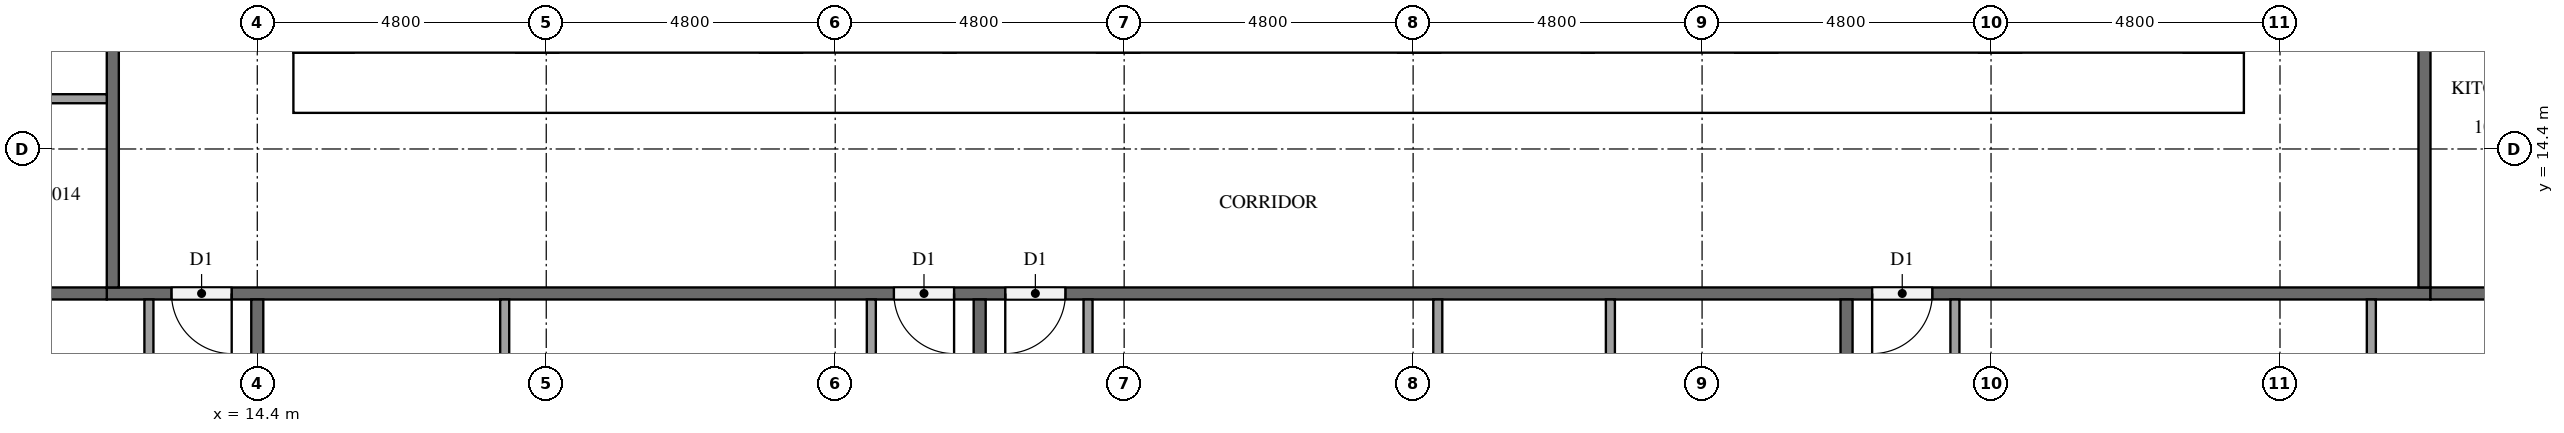
"""IFC4 building model, lengths in metres.
Left out: names, types, materials, properties, quantities, classifications, styles, units other than length and angle.
Written with IfcOpenShell. Run it as: python <this file> out.ifc"""

import sys

from ifc_helpers import new_model, si_unit, direction, frame, frame_2d, origin, place, context, subcontext, project, spatial, rectangle, extrude, element, fill, save


model = new_model("IFC4")
c1 = context("Model", 3, precision=1e-05, world=origin(), true_north=direction((0.0, 1.0)))
c2 = subcontext(c1, "Body", "Model", "MODEL_VIEW")
j1 = project(units=[si_unit("LENGTHUNIT", "METRE"), si_unit("PLANEANGLEUNIT", "RADIAN")], contexts=[c1])
p1 = place(None, origin())
s1 = spatial("IfcSite", under=j1, at=p1, CompositionType="ELEMENT")
p2 = place(p1, origin())
s2 = spatial("IfcBuilding", under=s1, at=p2, CompositionType="ELEMENT")
p3 = place(p2, frame((0.0, 0.0, 43.4)))
s3 = spatial("IfcBuildingStorey", under=s2, at=p3, CompositionType="ELEMENT", Elevation=43.4)
p4 = place(p3, frame((15.0, 15.5, 0.0), z_axis=(0.0, 0.0, 1.0), x_axis=(1.0, 0.0, 0.0)))
e1 = element("IfcWall", 1, at=p4, inside=s3, PredefinedType="SHEAR", context=c2, shape_type="SweptSolid", body=[
    extrude(rectangle(XDim=32.4, YDim=1.0, at=frame_2d((16.2, 0.0))), origin(), (0.0, 0.0, 1.0), 3.2),
])
p5 = place(p4, frame((15.3, 0.0, 0.0)))
e2 = element("IfcOpeningElement", 2, at=p5, cuts=e1, PredefinedType="OPENING", context=c2, shape_type="SweptSolid", body=[
    extrude(rectangle(XDim=1.8, YDim=2.1, at=frame_2d((0.9, 1.05))), frame((0.0, 0.51, 0.0), z_axis=(0.0, -1.0, 0.0), x_axis=(1.0, 0.0, 0.0)), (0.0, 0.0, 1.0), 1.02),
])
p6 = place(p3, frame((15.5, 16.0, 0.0), z_axis=(0.0, 0.0, 1.0), x_axis=(0.0, 1.0, 0.0)))
e3 = element("IfcWall", 3, at=p6, inside=s3, PredefinedType="SHEAR", context=c2, shape_type="SweptSolid", body=[
    extrude(rectangle(XDim=20.8, YDim=1.0, at=frame_2d((10.4, 0.0))), origin(), (0.0, 0.0, 1.0), 3.2),
])
p7 = place(p6, frame((4.76, 0.0, 0.0)))
e4 = element("IfcOpeningElement", 4, at=p7, cuts=e3, PredefinedType="OPENING", context=c2, shape_type="SweptSolid", body=[
    extrude(rectangle(XDim=1.2, YDim=2.1, at=frame_2d((0.6, 1.05))), frame((0.0, 0.51, 0.0), z_axis=(0.0, -1.0, 0.0), x_axis=(1.0, 0.0, 0.0)), (0.0, 0.0, 1.0), 1.02),
])
p8 = place(p3, frame((46.9, 16.0, 0.0), z_axis=(0.0, 0.0, 1.0), x_axis=(0.0, 1.0, 0.0)))
e5 = element("IfcWall", 5, at=p8, inside=s3, PredefinedType="SHEAR", context=c2, shape_type="SweptSolid", body=[
    extrude(rectangle(XDim=20.8, YDim=1.0, at=frame_2d((10.4, 0.0))), origin(), (0.0, 0.0, 1.0), 3.2),
])
p9 = place(p8, frame((10.1, 0.0, 0.0)))
e6 = element("IfcOpeningElement", 6, at=p9, cuts=e5, PredefinedType="OPENING", context=c2, shape_type="SweptSolid", body=[
    extrude(rectangle(XDim=1.2, YDim=2.1, at=frame_2d((0.6, 1.05))), frame((0.0, 0.51, 0.0), z_axis=(0.0, -1.0, 0.0), x_axis=(1.0, 0.0, 0.0)), (0.0, 0.0, 1.0), 1.02),
])
p10 = place(p3, frame((23.1, 16.0, 0.0), z_axis=(0.0, 0.0, 1.0), x_axis=(0.0, 1.0, 0.0)))
e7 = element("IfcWall", 7, at=p10, inside=s3, PredefinedType="SHEAR", context=c2, shape_type="SweptSolid", body=[
    extrude(rectangle(XDim=20.8, YDim=0.7, at=frame_2d((10.4, 0.0))), origin(), (0.0, 0.0, 1.0), 3.2),
])
p11 = place(p3, frame((50.5, 12.0, 0.0), z_axis=(0.0, 0.0, 1.0), x_axis=(-1.0, 0.0, 0.0)))
e8 = element("IfcWall", 8, at=p11, inside=s3, PredefinedType="PARTITIONING", context=c2, shape_type="SweptSolid", body=[
    extrude(rectangle(XDim=38.6, YDim=0.2, at=frame_2d((19.3, 0.0))), origin(), (0.0, 0.0, 1.0), 3.2),
])
p12 = place(p11, frame((36.525, 0.0, 0.0)))
e9 = element("IfcOpeningElement", 9, at=p12, cuts=e8, PredefinedType="OPENING", context=c2, shape_type="SweptSolid", body=[
    extrude(rectangle(XDim=1.0, YDim=2.1, at=frame_2d((0.5, 1.05))), frame((0.0, 0.11, 0.0), z_axis=(0.0, -1.0, 0.0), x_axis=(1.0, 0.0, 0.0)), (0.0, 0.0, 1.0), 0.22),
])
p13 = place(p11, frame((24.525, 0.0, 0.0)))
e10 = element("IfcOpeningElement", 10, at=p13, cuts=e8, PredefinedType="OPENING", context=c2, shape_type="SweptSolid", body=[
    extrude(rectangle(XDim=1.0, YDim=2.1, at=frame_2d((0.5, 1.05))), frame((0.0, 0.11, 0.0), z_axis=(0.0, -1.0, 0.0), x_axis=(1.0, 0.0, 0.0)), (0.0, 0.0, 1.0), 0.22),
])
p14 = place(p11, frame((22.675, 0.0, 0.0)))
e11 = element("IfcOpeningElement", 11, at=p14, cuts=e8, PredefinedType="OPENING", context=c2, shape_type="SweptSolid", body=[
    extrude(rectangle(XDim=1.0, YDim=2.1, at=frame_2d((0.5, 1.05))), frame((0.0, 0.11, 0.0), z_axis=(0.0, -1.0, 0.0), x_axis=(1.0, 0.0, 0.0)), (0.0, 0.0, 1.0), 0.22),
])
p15 = place(p11, frame((8.275, 0.0, 0.0)))
e12 = element("IfcOpeningElement", 12, at=p15, cuts=e8, PredefinedType="OPENING", context=c2, shape_type="SweptSolid", body=[
    extrude(rectangle(XDim=1.0, YDim=2.1, at=frame_2d((0.5, 1.05))), frame((0.0, 0.11, 0.0), z_axis=(0.0, -1.0, 0.0), x_axis=(1.0, 0.0, 0.0)), (0.0, 0.0, 1.0), 0.22),
])
p16 = place(p3, frame((50.4, 40.7, 0.0), z_axis=(0.0, 0.0, 1.0), x_axis=(0.0, -1.0, 0.0)))
e13 = element("IfcWall", 13, at=p16, inside=s3, PredefinedType="PARTITIONING", context=c2, shape_type="SweptSolid", body=[
    extrude(rectangle(XDim=28.6, YDim=0.2, at=frame_2d((14.3, 0.0))), origin(), (0.0, 0.0, 1.0), 3.2),
])
p17 = place(p16, frame((17.125, 0.0, 0.0)))
e14 = element("IfcOpeningElement", 14, at=p17, cuts=e13, PredefinedType="OPENING", context=c2, shape_type="SweptSolid", body=[
    extrude(rectangle(XDim=1.0, YDim=2.1, at=frame_2d((0.5, 1.05))), frame((0.0, 0.11, 0.0), z_axis=(0.0, -1.0, 0.0), x_axis=(1.0, 0.0, 0.0)), (0.0, 0.0, 1.0), 0.22),
])
p18 = place(p16, frame((15.275, 0.0, 0.0)))
e15 = element("IfcOpeningElement", 15, at=p18, cuts=e13, PredefinedType="OPENING", context=c2, shape_type="SweptSolid", body=[
    extrude(rectangle(XDim=1.0, YDim=2.1, at=frame_2d((0.5, 1.05))), frame((0.0, 0.11, 0.0), z_axis=(0.0, -1.0, 0.0), x_axis=(1.0, 0.0, 0.0)), (0.0, 0.0, 1.0), 0.22),
])
p19 = place(p16, frame((5.675, 0.0, 0.0)))
e16 = element("IfcOpeningElement", 16, at=p19, cuts=e13, PredefinedType="OPENING", context=c2, shape_type="SweptSolid", body=[
    extrude(rectangle(XDim=1.0, YDim=2.1, at=frame_2d((0.5, 1.05))), frame((0.0, 0.11, 0.0), z_axis=(0.0, -1.0, 0.0), x_axis=(1.0, 0.0, 0.0)), (0.0, 0.0, 1.0), 0.22),
])
p20 = place(p3, frame((12.0, 12.1, 0.0), z_axis=(0.0, 0.0, 1.0), x_axis=(0.0, 1.0, 0.0)))
e17 = element("IfcWall", 17, at=p20, inside=s3, PredefinedType="PARTITIONING", context=c2, shape_type="SweptSolid", body=[
    extrude(rectangle(XDim=28.6, YDim=0.2, at=frame_2d((14.3, 0.0))), origin(), (0.0, 0.0, 1.0), 3.2),
])
p21 = place(p20, frame((26.725, 0.0, 0.0)))
e18 = element("IfcOpeningElement", 18, at=p21, cuts=e17, PredefinedType="OPENING", context=c2, shape_type="SweptSolid", body=[
    extrude(rectangle(XDim=1.0, YDim=2.1, at=frame_2d((0.5, 1.05))), frame((0.0, 0.11, 0.0), z_axis=(0.0, -1.0, 0.0), x_axis=(1.0, 0.0, 0.0)), (0.0, 0.0, 1.0), 0.22),
])
p22 = place(p20, frame((17.125, 0.0, 0.0)))
e19 = element("IfcOpeningElement", 19, at=p22, cuts=e17, PredefinedType="OPENING", context=c2, shape_type="SweptSolid", body=[
    extrude(rectangle(XDim=1.0, YDim=2.1, at=frame_2d((0.5, 1.05))), frame((0.0, 0.11, 0.0), z_axis=(0.0, -1.0, 0.0), x_axis=(1.0, 0.0, 0.0)), (0.0, 0.0, 1.0), 0.22),
])
p23 = place(p20, frame((15.275, 0.0, 0.0)))
e20 = element("IfcOpeningElement", 20, at=p23, cuts=e17, PredefinedType="OPENING", context=c2, shape_type="SweptSolid", body=[
    extrude(rectangle(XDim=1.0, YDim=2.1, at=frame_2d((0.5, 1.05))), frame((0.0, 0.11, 0.0), z_axis=(0.0, -1.0, 0.0), x_axis=(1.0, 0.0, 0.0)), (0.0, 0.0, 1.0), 0.22),
])
p24 = place(p20, frame((5.675, 0.0, 0.0)))
e21 = element("IfcOpeningElement", 21, at=p24, cuts=e17, PredefinedType="OPENING", context=c2, shape_type="SweptSolid", body=[
    extrude(rectangle(XDim=1.0, YDim=2.1, at=frame_2d((0.5, 1.05))), frame((0.0, 0.11, 0.0), z_axis=(0.0, -1.0, 0.0), x_axis=(1.0, 0.0, 0.0)), (0.0, 0.0, 1.0), 0.22),
])
p25 = place(p3, frame((14.4, 11.9, 0.0), z_axis=(0.0, 0.0, 1.0), x_axis=(0.0, -1.0, 0.0)))
e22 = element("IfcWall", 22, at=p25, inside=s3, PredefinedType="PARTITIONING", context=c2, shape_type="SweptSolid", body=[
    extrude(rectangle(XDim=11.45, YDim=0.2, at=frame_2d((5.725, 0.0))), origin(), (0.0, 0.0, 1.0), 3.2),
])
for number, where, z_axis, x_axis in (
    (23, (0.1, 12.0, 0.0), (0.0, 0.0, 1.0), (1.0, 0.0, 0.0)),
    (24, (26.4, 11.9, 0.0), (0.0, 0.0, 1.0), (0.0, -1.0, 0.0)),
    (25, (40.8, 11.9, 0.0), (0.0, 0.0, 1.0), (0.0, -1.0, 0.0)),
):
    element("IfcWall", number, at=place(p3, frame(where, z_axis=z_axis, x_axis=x_axis)), inside=s3, PredefinedType="PARTITIONING", context=c2, shape_type="SweptSolid", body=[
        extrude(rectangle(XDim=11.8, YDim=0.2, at=frame_2d((5.9, 0.0))), origin(), (0.0, 0.0, 1.0), 3.2),
    ])
p26 = place(p3, frame((50.5, 12.0, 0.0), z_axis=(0.0, 0.0, 1.0), x_axis=(1.0, 0.0, 0.0)))
e26 = element("IfcWall", 26, at=p26, inside=s3, PredefinedType="PARTITIONING", context=c2, shape_type="SweptSolid", body=[
    extrude(rectangle(XDim=7.0, YDim=0.2, at=frame_2d((3.5, 0.0))), origin(), (0.0, 0.0, 1.0), 3.2),
])
p27 = place(p3, frame((12.6, 11.9, 0.0), z_axis=(0.0, 0.0, 1.0), x_axis=(0.0, -1.0, 0.0)))
e27 = element("IfcWall", 27, at=p27, inside=s3, PredefinedType="PARTITIONING", context=c2, shape_type="SweptSolid", body=[
    extrude(rectangle(XDim=3.875, YDim=0.15, at=frame_2d((1.938, 0.0))), origin(), (0.0, 0.0, 1.0), 3.2),
])
p28 = place(p3, frame((18.51, 11.9, 0.0), z_axis=(0.0, 0.0, 1.0), x_axis=(0.0, -1.0, 0.0)))
e28 = element("IfcWall", 28, at=p28, inside=s3, PredefinedType="PARTITIONING", context=c2, shape_type="SweptSolid", body=[
    extrude(rectangle(XDim=3.125, YDim=0.15, at=frame_2d((1.562, 0.0))), origin(), (0.0, 0.0, 1.0), 3.2),
])
p29 = place(p3, frame((24.6, 11.9, 0.0), z_axis=(0.0, 0.0, 1.0), x_axis=(0.0, -1.0, 0.0)))
e29 = element("IfcWall", 29, at=p29, inside=s3, PredefinedType="PARTITIONING", context=c2, shape_type="SweptSolid", body=[
    extrude(rectangle(XDim=3.275, YDim=0.15, at=frame_2d((1.637, 0.0))), origin(), (0.0, 0.0, 1.0), 3.2),
])
for number, where, z_axis, x_axis in (
    (30, (34.01, 11.9, 0.0), (0.0, 0.0, 1.0), (0.0, -1.0, 0.0)),
    (31, (36.877, 11.9, 0.0), (0.0, 0.0, 1.0), (0.0, -1.0, 0.0)),
):
    element("IfcWall", number, at=place(p3, frame(where, z_axis=z_axis, x_axis=x_axis)), inside=s3, PredefinedType="PARTITIONING", context=c2, shape_type="SweptSolid", body=[
        extrude(rectangle(XDim=3.575, YDim=0.15, at=frame_2d((1.788, 0.0))), origin(), (0.0, 0.0, 1.0), 3.2),
    ])
p30 = place(p3, frame((28.2, 11.9, 0.0), z_axis=(0.0, 0.0, 1.0), x_axis=(0.0, -1.0, 0.0)))
e32 = element("IfcWall", 32, at=p30, inside=s3, PredefinedType="PARTITIONING", context=c2, shape_type="SweptSolid", body=[
    extrude(rectangle(XDim=3.725, YDim=0.15, at=frame_2d((1.862, 0.0))), origin(), (0.0, 0.0, 1.0), 3.2),
])
p31 = place(p3, frame((49.517, 11.9, 0.0), z_axis=(0.0, 0.0, 1.0), x_axis=(0.0, -1.0, 0.0)))
e33 = element("IfcWall", 33, at=p31, inside=s3, PredefinedType="PARTITIONING", context=c2, shape_type="SweptSolid", body=[
    extrude(rectangle(XDim=3.875, YDim=0.15, at=frame_2d((1.938, 0.0))), origin(), (0.0, 0.0, 1.0), 3.2),
])
p32 = place(p3, frame((42.6, 11.9, 0.0), z_axis=(0.0, 0.0, 1.0), x_axis=(0.0, -1.0, 0.0)))
e34 = element("IfcWall", 34, at=p32, inside=s3, PredefinedType="PARTITIONING", context=c2, shape_type="SweptSolid", body=[
    extrude(rectangle(XDim=4.025, YDim=0.15, at=frame_2d((2.012, 0.0))), origin(), (0.0, 0.0, 1.0), 3.2),
])
p33 = place(p3, frame((11.9, 15.235, 0.0), z_axis=(0.0, 0.0, 1.0), x_axis=(-1.0, 0.0, 0.0)))
e35 = element("IfcWall", 35, at=p33, inside=s3, PredefinedType="PARTITIONING", context=c2, shape_type="SweptSolid", body=[
    extrude(rectangle(XDim=2.975, YDim=0.15, at=frame_2d((1.487, 0.0))), origin(), (0.0, 0.0, 1.0), 3.2),
])
p34 = place(p5, frame((1.8, 0.0, 0.0), z_axis=(0.0, 0.0, 1.0), x_axis=(-1.0, 0.0, 0.0)))
e36 = element("IfcDoor", 36, at=p34, inside=s3, OperationType="DOUBLE_DOOR_SINGLE_SWING", PredefinedType="DOOR", context=c2, shape_type="SweptSolid", body=[
    extrude(rectangle(XDim=1.8, YDim=2.1, at=frame_2d((0.9, 1.05))), frame((0.0, 0.025, 0.0), z_axis=(0.0, -1.0, 0.0), x_axis=(1.0, 0.0, 0.0)), (0.0, 0.0, 1.0), 0.05),
])
fill(e2, e36)
p35 = place(p12, origin())
e37 = element("IfcDoor", 37, at=p35, inside=s3, OperationType="SINGLE_SWING_LEFT", PredefinedType="DOOR", context=c2, shape_type="SweptSolid", body=[
    extrude(rectangle(XDim=1.0, YDim=2.1, at=frame_2d((0.5, 1.05))), frame((0.0, 0.025, 0.0), z_axis=(0.0, -1.0, 0.0), x_axis=(1.0, 0.0, 0.0)), (0.0, 0.0, 1.0), 0.05),
])
fill(e9, e37)
p36 = place(p13, origin())
e38 = element("IfcDoor", 38, at=p36, inside=s3, OperationType="SINGLE_SWING_LEFT", PredefinedType="DOOR", context=c2, shape_type="SweptSolid", body=[
    extrude(rectangle(XDim=1.0, YDim=2.1, at=frame_2d((0.5, 1.05))), frame((0.0, 0.025, 0.0), z_axis=(0.0, -1.0, 0.0), x_axis=(1.0, 0.0, 0.0)), (0.0, 0.0, 1.0), 0.05),
])
fill(e10, e38)
p37 = place(p14, origin())
e39 = element("IfcDoor", 39, at=p37, inside=s3, OperationType="SINGLE_SWING_RIGHT", PredefinedType="DOOR", context=c2, shape_type="SweptSolid", body=[
    extrude(rectangle(XDim=1.0, YDim=2.1, at=frame_2d((0.5, 1.05))), frame((0.0, 0.025, 0.0), z_axis=(0.0, -1.0, 0.0), x_axis=(1.0, 0.0, 0.0)), (0.0, 0.0, 1.0), 0.05),
])
fill(e11, e39)
p38 = place(p15, origin())
e40 = element("IfcDoor", 40, at=p38, inside=s3, OperationType="SINGLE_SWING_RIGHT", PredefinedType="DOOR", context=c2, shape_type="SweptSolid", body=[
    extrude(rectangle(XDim=1.0, YDim=2.1, at=frame_2d((0.5, 1.05))), frame((0.0, 0.025, 0.0), z_axis=(0.0, -1.0, 0.0), x_axis=(1.0, 0.0, 0.0)), (0.0, 0.0, 1.0), 0.05),
])
fill(e12, e40)
save(model, sys.argv[1])
